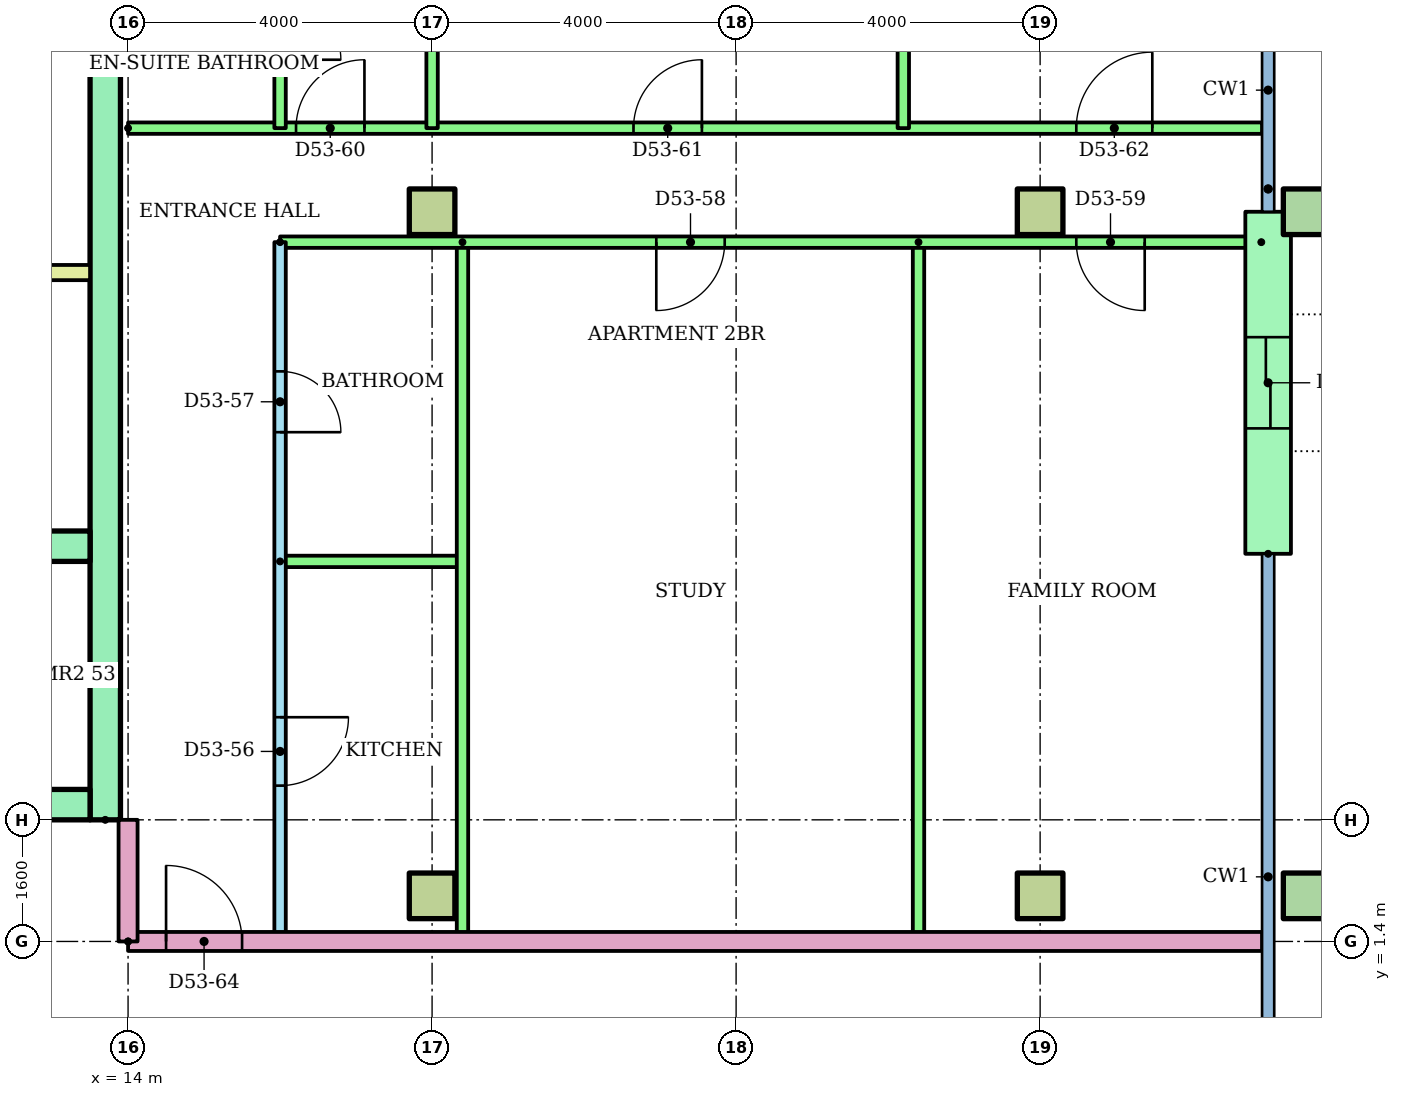
"""IFC4 building model, lengths in metres.
Left out: names, types, materials, properties, quantities, classifications, styles, units other than length and angle.
Written with IfcOpenShell. Run it as: python <this file> out.ifc"""

import sys

from ifc_helpers import new_model, si_unit, direction, frame, frame_2d, origin, origin_2d, place, context, subcontext, project, spatial, rectangle, hollow_rectangle, extrude, element, fill, save


model = new_model("IFC4")
c1 = context("Model", 3, precision=1e-05, world=origin(), true_north=direction((0.0, 1.0)))
c2 = subcontext(c1, "Body", "Model", "MODEL_VIEW")
j1 = project(units=[si_unit("LENGTHUNIT", "METRE"), si_unit("PLANEANGLEUNIT", "RADIAN")], contexts=[c1])
p1 = place(None, origin())
s1 = spatial("IfcSite", under=j1, at=p1, CompositionType="ELEMENT")
p2 = place(p1, origin())
s2 = spatial("IfcBuilding", under=s1, at=p2, CompositionType="ELEMENT")
p3 = place(p2, frame((0.0, 0.0, 207.6)))
s3 = spatial("IfcBuildingStorey", under=s2, at=p3, CompositionType="ELEMENT", Elevation=207.6)
for number, where in (
    (1, (18.0, 2.0, 0.0)),
    (2, (26.0, 2.0, 0.0)),
):
    element("IfcColumn", number, at=place(p3, frame(where)), inside=s3, PredefinedType="COLUMN", context=c2, shape_type="SweptSolid", body=[
        extrude(rectangle(XDim=0.6, YDim=0.6, at=origin_2d()), origin(), (0.0, 0.0, 1.0), 3.2),
    ])
p4 = place(p3, frame((29.5, 2.0, 0.0)))
e3 = element("IfcColumn", 3, at=p4, inside=s3, PredefinedType="COLUMN", context=c2, shape_type="SweptSolid", body=[
    extrude(hollow_rectangle(XDim=0.6, YDim=0.6, WallThickness=0.03, at=origin_2d()), origin(), (0.0, 0.0, 1.0), 3.2),
])
for number, where in (
    (4, (18.0, 11.0, 0.0)),
    (5, (26.0, 11.0, 0.0)),
):
    element("IfcColumn", number, at=place(p3, frame(where)), inside=s3, PredefinedType="COLUMN", context=c2, shape_type="SweptSolid", body=[
        extrude(rectangle(XDim=0.6, YDim=0.6, at=origin_2d()), origin(), (0.0, 0.0, 1.0), 3.2),
    ])
p5 = place(p3, frame((29.5, 11.0, 0.0)))
e6 = element("IfcColumn", 6, at=p5, inside=s3, PredefinedType="COLUMN", context=c2, shape_type="SweptSolid", body=[
    extrude(hollow_rectangle(XDim=0.6, YDim=0.6, WallThickness=0.03, at=origin_2d()), origin(), (0.0, 0.0, 1.0), 3.2),
])
p6 = place(p3, frame((29.0, 6.5, 0.0), z_axis=(0.0, 0.0, 1.0), x_axis=(0.0, 1.0, 0.0)))
e7 = element("IfcWall", 7, at=p6, inside=s3, PredefinedType="STANDARD", context=c2, shape_type="SweptSolid", body=[
    extrude(rectangle(XDim=4.5, YDim=0.6, at=frame_2d((2.25, 0.0))), origin(), (0.0, 0.0, 1.0), 2.92),
])
p7 = place(p6, frame((1.65, 0.0, 0.0)))
e8 = element("IfcOpeningElement", 8, at=p7, cuts=e7, PredefinedType="OPENING", context=c2, shape_type="SweptSolid", body=[
    extrude(rectangle(XDim=1.2, YDim=2.1, at=frame_2d((0.6, 1.05))), frame((0.0, 0.31, 0.0), z_axis=(0.0, -1.0, 0.0), x_axis=(1.0, 0.0, 0.0)), (0.0, 0.0, 1.0), 0.62),
])
p8 = place(p3, frame((13.7, 3.0, 0.0), z_axis=(0.0, 0.0, 1.0), x_axis=(0.0, 1.0, 0.0)))
e9 = element("IfcWall", 9, at=p8, inside=s3, PredefinedType="SHEAR", context=c2, shape_type="SweptSolid", body=[
    extrude(rectangle(XDim=17.0, YDim=0.4, at=frame_2d((8.5, 0.0))), origin(), (0.0, 0.0, 1.0), 2.92),
])
p9 = place(p3, frame((-13.5, 3.2, 0.0)))
e10 = element("IfcWall", 10, at=p9, inside=s3, PredefinedType="SHEAR", context=c2, shape_type="SweptSolid", body=[
    extrude(rectangle(XDim=27.0, YDim=0.4, at=frame_2d((13.5, 0.0))), origin(), (0.0, 0.0, 1.0), 2.92),
])
p10 = place(p9, frame((22.083, 0.0, 0.0)))
e11 = element("IfcOpeningElement", 11, at=p10, cuts=e10, PredefinedType="OPENING", context=c2, shape_type="SweptSolid", body=[
    extrude(rectangle(XDim=1.1, YDim=2.1, at=frame_2d((0.55, 1.05))), frame((0.0, 0.21, 0.0), z_axis=(0.0, -1.0, 0.0), x_axis=(1.0, 0.0, 0.0)), (0.0, 0.0, 1.0), 0.42),
])
p11 = place(p9, frame((25.128, 0.0, 0.0)))
e12 = element("IfcOpeningElement", 12, at=p11, cuts=e10, PredefinedType="OPENING", context=c2, shape_type="SweptSolid", body=[
    extrude(rectangle(XDim=1.1, YDim=2.1, at=frame_2d((0.55, 1.05))), frame((0.0, 0.21, 0.0), z_axis=(0.0, -1.0, 0.0), x_axis=(1.0, 0.0, 0.0)), (0.0, 0.0, 1.0), 0.42),
])
p12 = place(p9, frame((12.6, 0.0, 0.0)))
e13 = element("IfcOpeningElement", 13, at=p12, cuts=e10, PredefinedType="OPENING", context=c2, shape_type="SweptSolid", body=[
    extrude(rectangle(XDim=1.8, YDim=2.1, at=frame_2d((0.9, 1.05))), frame((0.0, 0.21, 0.0), z_axis=(0.0, -1.0, 0.0), x_axis=(1.0, 0.0, 0.0)), (0.0, 0.0, 1.0), 0.42),
])
p13 = place(p3, frame((1.522, 6.6, 0.0)))
e14 = element("IfcWall", 14, at=p13, inside=s3, PredefinedType="SHEAR", context=c2, shape_type="SweptSolid", body=[
    extrude(rectangle(XDim=11.978, YDim=0.4, at=frame_2d((5.989, 0.0))), origin(), (0.0, 0.0, 1.0), 2.92),
])
p14 = place(p13, frame((1.022, 0.0, 0.0)))
e15 = element("IfcOpeningElement", 15, at=p14, cuts=e14, PredefinedType="OPENING", context=c2, shape_type="SweptSolid", body=[
    extrude(rectangle(XDim=1.0, YDim=2.1, at=frame_2d((0.5, 1.05))), frame((0.0, 0.21, 0.0), z_axis=(0.0, -1.0, 0.0), x_axis=(1.0, 0.0, 0.0)), (0.0, 0.0, 1.0), 0.42),
])
p15 = place(p13, frame((4.067, 0.0, 0.0)))
e16 = element("IfcOpeningElement", 16, at=p15, cuts=e14, PredefinedType="OPENING", context=c2, shape_type="SweptSolid", body=[
    extrude(rectangle(XDim=1.0, YDim=2.1, at=frame_2d((0.5, 1.05))), frame((0.0, 0.21, 0.0), z_axis=(0.0, -1.0, 0.0), x_axis=(1.0, 0.0, 0.0)), (0.0, 0.0, 1.0), 0.42),
])
p16 = place(p3, frame((9.6, 10.2, 0.0)))
e17 = element("IfcWall", 17, at=p16, inside=s3, PredefinedType="PARTITIONING", context=c2, shape_type="SweptSolid", body=[
    extrude(rectangle(XDim=3.9, YDim=0.2, at=frame_2d((1.95, 0.0))), origin(), (0.0, 0.0, 1.0), 2.92),
])
p17 = place(p3, frame((16.0, 10.6, 0.0), z_axis=(0.0, 0.0, 1.0), x_axis=(0.0, -1.0, 0.0)))
e18 = element("IfcWall", 18, at=p17, inside=s3, PredefinedType="PARTITIONING", context=c2, shape_type="SweptSolid", body=[
    extrude(rectangle(XDim=9.2, YDim=0.15, at=frame_2d((4.6, 0.0))), origin(), (0.0, 0.0, 1.0), 2.4),
])
p18 = place(p17, frame((6.25, 0.0, 0.0)))
e19 = element("IfcOpeningElement", 19, at=p18, cuts=e18, PredefinedType="OPENING", context=c2, shape_type="SweptSolid", body=[
    extrude(rectangle(XDim=0.9, YDim=2.1, at=frame_2d((0.45, 1.05))), frame((0.0, 0.085, 0.0), z_axis=(0.0, -1.0, 0.0), x_axis=(1.0, 0.0, 0.0)), (0.0, 0.0, 1.0), 0.17),
])
p19 = place(p17, frame((1.7, 0.0, 0.0)))
e20 = element("IfcOpeningElement", 20, at=p19, cuts=e18, PredefinedType="OPENING", context=c2, shape_type="SweptSolid", body=[
    extrude(rectangle(XDim=0.8, YDim=2.1, at=frame_2d((0.4, 1.05))), frame((0.0, 0.085, 0.0), z_axis=(0.0, -1.0, 0.0), x_axis=(1.0, 0.0, 0.0)), (0.0, 0.0, 1.0), 0.17),
])
p20 = place(p3, frame((16.0, 6.4, 0.0)))
e21 = element("IfcWall", 21, at=p20, inside=s3, PredefinedType="PARTITIONING", context=c2, shape_type="SweptSolid", body=[
    extrude(rectangle(XDim=2.4, YDim=0.15, at=frame_2d((1.2, 0.0))), origin(), (0.0, 0.0, 1.0), 2.4),
])
for number, where, z_axis, x_axis in (
    (22, (18.4, 10.6, 0.0), (0.0, 0.0, 1.0), (0.0, -1.0, 0.0)),
    (23, (24.4, 10.6, 0.0), (0.0, 0.0, 1.0), (0.0, -1.0, 0.0)),
):
    element("IfcWall", number, at=place(p3, frame(where, z_axis=z_axis, x_axis=x_axis)), inside=s3, PredefinedType="PARTITIONING", context=c2, shape_type="SweptSolid", body=[
        extrude(rectangle(XDim=9.2, YDim=0.15, at=frame_2d((4.6, 0.0))), origin(), (0.0, 0.0, 1.0), 2.4),
    ])
p21 = place(p3, frame((28.91, 10.6, 0.0), z_axis=(0.0, 0.0, 1.0), x_axis=(-1.0, 0.0, 0.0)))
e24 = element("IfcWall", 24, at=p21, inside=s3, PredefinedType="PARTITIONING", context=c2, shape_type="SweptSolid", body=[
    extrude(rectangle(XDim=12.91, YDim=0.15, at=frame_2d((6.455, 0.0))), origin(), (0.0, 0.0, 1.0), 2.4),
])
p22 = place(p21, frame((7.06, 0.0, 0.0)))
e25 = element("IfcOpeningElement", 25, at=p22, cuts=e24, PredefinedType="OPENING", context=c2, shape_type="SweptSolid", body=[
    extrude(rectangle(XDim=0.9, YDim=2.1, at=frame_2d((0.45, 1.05))), frame((0.0, 0.085, 0.0), z_axis=(0.0, -1.0, 0.0), x_axis=(1.0, 0.0, 0.0)), (0.0, 0.0, 1.0), 0.17),
])
p23 = place(p21, frame((1.534, 0.0, 0.0)))
e26 = element("IfcOpeningElement", 26, at=p23, cuts=e24, PredefinedType="OPENING", context=c2, shape_type="SweptSolid", body=[
    extrude(rectangle(XDim=0.9, YDim=2.1, at=frame_2d((0.45, 1.05))), frame((0.0, 0.085, 0.0), z_axis=(0.0, -1.0, 0.0), x_axis=(1.0, 0.0, 0.0)), (0.0, 0.0, 1.0), 0.17),
])
p24 = place(p3, frame((14.0, 12.1, 0.0)))
e27 = element("IfcWall", 27, at=p24, inside=s3, PredefinedType="PARTITIONING", context=c2, shape_type="SweptSolid", body=[
    extrude(rectangle(XDim=14.92, YDim=0.15, at=frame_2d((7.46, 0.0))), origin(), (0.0, 0.0, 1.0), 2.4),
])
p25 = place(p24, frame((2.21, 0.0, 0.0)))
e28 = element("IfcOpeningElement", 28, at=p25, cuts=e27, PredefinedType="OPENING", context=c2, shape_type="SweptSolid", body=[
    extrude(rectangle(XDim=0.9, YDim=2.1, at=frame_2d((0.45, 1.05))), frame((0.0, 0.085, 0.0), z_axis=(0.0, -1.0, 0.0), x_axis=(1.0, 0.0, 0.0)), (0.0, 0.0, 1.0), 0.17),
])
p26 = place(p24, frame((6.65, 0.0, 0.0)))
e29 = element("IfcOpeningElement", 29, at=p26, cuts=e27, PredefinedType="OPENING", context=c2, shape_type="SweptSolid", body=[
    extrude(rectangle(XDim=0.9, YDim=2.1, at=frame_2d((0.45, 1.05))), frame((0.0, 0.085, 0.0), z_axis=(0.0, -1.0, 0.0), x_axis=(1.0, 0.0, 0.0)), (0.0, 0.0, 1.0), 0.17),
])
p27 = place(p24, frame((12.476, 0.0, 0.0)))
e30 = element("IfcOpeningElement", 30, at=p27, cuts=e27, PredefinedType="OPENING", context=c2, shape_type="SweptSolid", body=[
    extrude(rectangle(XDim=1.0, YDim=2.1, at=frame_2d((0.5, 1.05))), frame((0.0, 0.085, 0.0), z_axis=(0.0, -1.0, 0.0), x_axis=(1.0, 0.0, 0.0)), (0.0, 0.0, 1.0), 0.17),
])
p28 = place(p3, frame((18.0, 18.921, 0.0), z_axis=(0.0, 0.0, 1.0), x_axis=(0.0, -1.0, 0.0)))
e31 = element("IfcWall", 31, at=p28, inside=s3, PredefinedType="PARTITIONING", context=c2, shape_type="SweptSolid", body=[
    extrude(rectangle(XDim=6.821, YDim=0.15, at=frame_2d((3.41, 0.0))), origin(), (0.0, 0.0, 1.0), 2.4),
])
p29 = place(p3, frame((24.2, 17.12, 0.0), z_axis=(0.0, 0.0, 1.0), x_axis=(0.0, -1.0, 0.0)))
e32 = element("IfcWall", 32, at=p29, inside=s3, PredefinedType="PARTITIONING", context=c2, shape_type="SweptSolid", body=[
    extrude(rectangle(XDim=5.02, YDim=0.15, at=frame_2d((2.51, 0.0))), origin(), (0.0, 0.0, 1.0), 2.4),
])
p30 = place(p3, frame((16.0, 14.4, 0.0), z_axis=(0.0, 0.0, 1.0), x_axis=(0.0, -1.0, 0.0)))
e33 = element("IfcWall", 33, at=p30, inside=s3, PredefinedType="PARTITIONING", context=c2, shape_type="SweptSolid", body=[
    extrude(rectangle(XDim=2.3, YDim=0.15, at=frame_2d((1.15, 0.0))), origin(), (0.0, 0.0, 1.0), 2.4),
])
p31 = place(p30, frame((0.6, 0.0, 0.0)))
e34 = element("IfcOpeningElement", 34, at=p31, cuts=e33, PredefinedType="OPENING", context=c2, shape_type="SweptSolid", body=[
    extrude(rectangle(XDim=0.8, YDim=2.1, at=frame_2d((0.4, 1.05))), frame((0.0, 0.085, 0.0), z_axis=(0.0, -1.0, 0.0), x_axis=(1.0, 0.0, 0.0)), (0.0, 0.0, 1.0), 0.17),
])
p32 = place(p3, frame((14.0, 1.4, 0.0)))
e35 = element("IfcWall", 35, at=p32, inside=s3, PredefinedType="PARTITIONING", context=c2, shape_type="SweptSolid", body=[
    extrude(rectangle(XDim=14.92, YDim=0.25, at=frame_2d((7.46, 0.0))), origin(), (0.0, 0.0, 1.0), 2.4),
])
p33 = place(p32, frame((0.5, 0.0, 0.0)))
e36 = element("IfcOpeningElement", 36, at=p33, cuts=e35, PredefinedType="OPENING", context=c2, shape_type="SweptSolid", body=[
    extrude(rectangle(XDim=1.0, YDim=2.1, at=frame_2d((0.5, 1.05))), frame((0.0, 0.135, 0.0), z_axis=(0.0, -1.0, 0.0), x_axis=(1.0, 0.0, 0.0)), (0.0, 0.0, 1.0), 0.27),
])
p34 = place(p3, frame((14.0, 1.4, 0.0), z_axis=(0.0, 0.0, 1.0), x_axis=(0.0, 1.0, 0.0)))
e37 = element("IfcWall", 37, at=p34, inside=s3, PredefinedType="PARTITIONING", context=c2, shape_type="SweptSolid", body=[
    extrude(rectangle(XDim=1.6, YDim=0.25, at=frame_2d((0.8, 0.0))), origin(), (0.0, 0.0, 1.0), 2.4),
])
p35 = place(p18, origin())
e38 = element("IfcDoor", 38, at=p35, inside=s3, OperationType="SINGLE_SWING_LEFT", PredefinedType="DOOR", context=c2, shape_type="SweptSolid", body=[
    extrude(rectangle(XDim=0.9, YDim=2.1, at=frame_2d((0.45, 1.05))), frame((0.0, 0.025, 0.0), z_axis=(0.0, -1.0, 0.0), x_axis=(1.0, 0.0, 0.0)), (0.0, 0.0, 1.0), 0.05),
])
fill(e19, e38)
p36 = place(p19, origin())
e39 = element("IfcDoor", 39, at=p36, inside=s3, OperationType="SINGLE_SWING_RIGHT", PredefinedType="DOOR", context=c2, shape_type="SweptSolid", body=[
    extrude(rectangle(XDim=0.8, YDim=2.1, at=frame_2d((0.4, 1.05))), frame((0.0, 0.025, 0.0), z_axis=(0.0, -1.0, 0.0), x_axis=(1.0, 0.0, 0.0)), (0.0, 0.0, 1.0), 0.05),
])
fill(e20, e39)
p37 = place(p22, origin())
e40 = element("IfcDoor", 40, at=p37, inside=s3, OperationType="SINGLE_SWING_RIGHT", PredefinedType="DOOR", context=c2, shape_type="SweptSolid", body=[
    extrude(rectangle(XDim=0.9, YDim=2.1, at=frame_2d((0.45, 1.05))), frame((0.0, 0.025, 0.0), z_axis=(0.0, -1.0, 0.0), x_axis=(1.0, 0.0, 0.0)), (0.0, 0.0, 1.0), 0.05),
])
fill(e25, e40)
p38 = place(p23, origin())
e41 = element("IfcDoor", 41, at=p38, inside=s3, OperationType="SINGLE_SWING_LEFT", PredefinedType="DOOR", context=c2, shape_type="SweptSolid", body=[
    extrude(rectangle(XDim=0.9, YDim=2.1, at=frame_2d((0.45, 1.05))), frame((0.0, 0.025, 0.0), z_axis=(0.0, -1.0, 0.0), x_axis=(1.0, 0.0, 0.0)), (0.0, 0.0, 1.0), 0.05),
])
fill(e26, e41)
p39 = place(p25, origin())
e42 = element("IfcDoor", 42, at=p39, inside=s3, OperationType="SINGLE_SWING_RIGHT", PredefinedType="DOOR", context=c2, shape_type="SweptSolid", body=[
    extrude(rectangle(XDim=0.9, YDim=2.1, at=frame_2d((0.45, 1.05))), frame((0.0, 0.025, 0.0), z_axis=(0.0, -1.0, 0.0), x_axis=(1.0, 0.0, 0.0)), (0.0, 0.0, 1.0), 0.05),
])
fill(e28, e42)
p40 = place(p26, origin())
e43 = element("IfcDoor", 43, at=p40, inside=s3, OperationType="SINGLE_SWING_RIGHT", PredefinedType="DOOR", context=c2, shape_type="SweptSolid", body=[
    extrude(rectangle(XDim=0.9, YDim=2.1, at=frame_2d((0.45, 1.05))), frame((0.0, 0.025, 0.0), z_axis=(0.0, -1.0, 0.0), x_axis=(1.0, 0.0, 0.0)), (0.0, 0.0, 1.0), 0.05),
])
fill(e29, e43)
p41 = place(p27, origin())
e44 = element("IfcDoor", 44, at=p41, inside=s3, OperationType="SINGLE_SWING_RIGHT", PredefinedType="DOOR", context=c2, shape_type="SweptSolid", body=[
    extrude(rectangle(XDim=1.0, YDim=2.1, at=frame_2d((0.5, 1.05))), frame((0.0, 0.025, 0.0), z_axis=(0.0, -1.0, 0.0), x_axis=(1.0, 0.0, 0.0)), (0.0, 0.0, 1.0), 0.05),
])
fill(e30, e44)
p42 = place(p31, origin())
e45 = element("IfcDoor", 45, at=p42, inside=s3, OperationType="SINGLE_SWING_RIGHT", PredefinedType="DOOR", context=c2, shape_type="SweptSolid", body=[
    extrude(rectangle(XDim=0.8, YDim=2.1, at=frame_2d((0.4, 1.05))), frame((0.0, 0.025, 0.0), z_axis=(0.0, -1.0, 0.0), x_axis=(1.0, 0.0, 0.0)), (0.0, 0.0, 1.0), 0.05),
])
fill(e34, e45)
p43 = place(p33, origin())
e46 = element("IfcDoor", 46, at=p43, inside=s3, OperationType="SINGLE_SWING_LEFT", PredefinedType="DOOR", context=c2, shape_type="SweptSolid", body=[
    extrude(rectangle(XDim=1.0, YDim=2.1, at=frame_2d((0.5, 1.05))), frame((0.0, 0.025, 0.0), z_axis=(0.0, -1.0, 0.0), x_axis=(1.0, 0.0, 0.0)), (0.0, 0.0, 1.0), 0.05),
])
fill(e36, e46)
p44 = place(p7, origin())
e47 = element("IfcDoor", 47, at=p44, inside=s3, OperationType="SLIDING_TO_LEFT", PredefinedType="DOOR", context=c2, shape_type="SweptSolid", body=[
    extrude(rectangle(XDim=1.2, YDim=2.1, at=frame_2d((0.6, 1.05))), frame((0.0, 0.025, 0.0), z_axis=(0.0, -1.0, 0.0), x_axis=(1.0, 0.0, 0.0)), (0.0, 0.0, 1.0), 0.05),
])
fill(e8, e47)
save(model, sys.argv[1])
